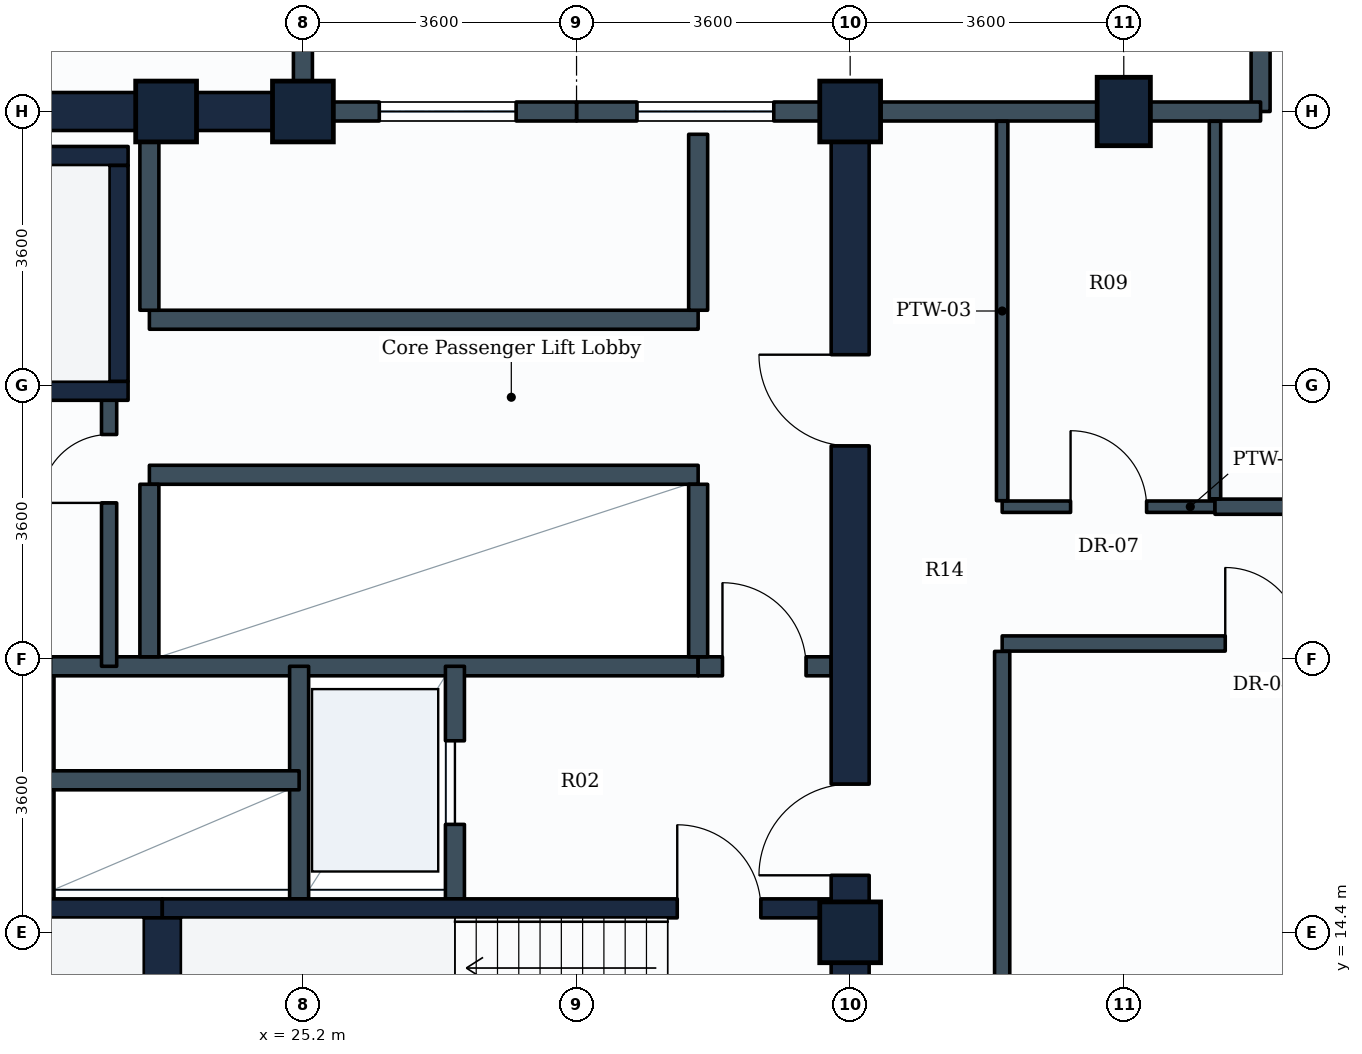
"""IFC4 building model, lengths in metres.
Left out: names, types, materials, properties, quantities, classifications, styles, units other than length and angle.
Written with IfcOpenShell. Run it as: python <this file> out.ifc"""

import sys

from ifc_helpers import new_model, si_unit, direction, frame, frame_2d, origin, origin_2d, place, context, subcontext, project, spatial, rectangle, extrude, element, fill, save


model = new_model("IFC4")
c1 = context("Model", 3, precision=1e-05, world=origin(), true_north=direction((0.0, 1.0)))
c2 = subcontext(c1, "Body", "Model", "MODEL_VIEW")
j1 = project(units=[si_unit("LENGTHUNIT", "METRE"), si_unit("PLANEANGLEUNIT", "RADIAN")], contexts=[c1])
p1 = place(None, origin())
s1 = spatial("IfcSite", under=j1, at=p1, CompositionType="ELEMENT")
p2 = place(p1, origin())
s2 = spatial("IfcBuilding", under=s1, at=p2, CompositionType="ELEMENT")
p3 = place(p2, frame((0.0, 0.0, 213.8)))
s3 = spatial("IfcBuildingStorey", under=s2, at=p3, CompositionType="ELEMENT", Elevation=213.8)
for number, where, z_axis, x_axis in (
    (1, (23.4, 25.2, 0.0), (0.0, 0.0, 1.0), (1.0, 0.0, 0.0)),
    (2, (25.2, 25.2, 0.0), (0.0, 0.0, 1.0), (1.0, 0.0, 0.0)),
    (3, (32.4, 14.4, 0.0), (0.0, 0.0, 1.0), (1.0, 0.0, 0.0)),
    (4, (32.4, 25.2, 0.0), (0.0, 0.0, 1.0), (1.0, 0.0, 0.0)),
):
    element("IfcColumn", number, at=place(p3, frame(where, z_axis=z_axis, x_axis=x_axis)), inside=s3, PredefinedType="COLUMN", context=c2, shape_type="SweptSolid", body=[
        extrude(rectangle(XDim=0.8, YDim=0.8, at=origin_2d()), origin(), (0.0, 0.0, 1.0), 3.6),
    ])
p4 = place(p3, frame((36.0, 25.2, 0.0), z_axis=(0.0, 0.0, 1.0), x_axis=(1.0, 0.0, 0.0)))
e5 = element("IfcColumn", 5, at=p4, inside=s3, PredefinedType="COLUMN", context=c2, shape_type="SweptSolid", body=[
    extrude(rectangle(XDim=0.7, YDim=0.9, at=origin_2d()), origin(), (0.0, 0.0, 1.0), 3.6),
])
p5 = place(p3, frame((37.8, 27.3, 0.0), z_axis=(0.0, 0.0, 1.0), x_axis=(0.0, -1.0, 0.0)))
e6 = element("IfcWall", 6, at=p5, inside=s3, PredefinedType="STANDARD", context=c2, shape_type="SweptSolid", body=[
    extrude(rectangle(XDim=2.1, YDim=0.25, at=frame_2d((1.05, 0.0))), origin(), (0.0, 0.0, 1.0), 2.73),
])
p6 = place(p3, frame((36.0, 25.2, 0.0), z_axis=(0.0, 0.0, 1.0), x_axis=(1.0, 0.0, 0.0)))
e7 = element("IfcWall", 7, at=p6, inside=s3, PredefinedType="STANDARD", context=c2, shape_type="SweptSolid", body=[
    extrude(rectangle(XDim=1.8, YDim=0.25, at=frame_2d((0.9, 0.0))), origin(), (0.0, 0.0, 1.0), 2.73),
])
p7 = place(p3, frame((32.4, 25.2, 0.0), z_axis=(0.0, 0.0, 1.0), x_axis=(1.0, 0.0, 0.0)))
e8 = element("IfcWall", 8, at=p7, inside=s3, PredefinedType="STANDARD", context=c2, shape_type="SweptSolid", body=[
    extrude(rectangle(XDim=3.6, YDim=0.25, at=frame_2d((1.8, 0.0))), origin(), (0.0, 0.0, 1.0), 2.73),
])
p8 = place(p3, frame((28.8, 25.2, 0.0), z_axis=(0.0, 0.0, 1.0), x_axis=(1.0, 0.0, 0.0)))
e9 = element("IfcWall", 9, at=p8, inside=s3, PredefinedType="STANDARD", context=c2, shape_type="SweptSolid", body=[
    extrude(rectangle(XDim=3.6, YDim=0.25, at=frame_2d((1.8, 0.0))), origin(), (0.0, 0.0, 1.0), 2.73),
])
p9 = place(p8, frame((0.795, 0.0, 0.85)))
e10 = element("IfcOpeningElement", 10, at=p9, cuts=e9, PredefinedType="OPENING", context=c2, shape_type="SweptSolid", body=[
    extrude(rectangle(XDim=1.8, YDim=1.35, at=frame_2d((0.9, 0.675))), frame((0.0, 0.135, 0.0), z_axis=(0.0, -1.0, 0.0), x_axis=(1.0, 0.0, 0.0)), (0.0, 0.0, 1.0), 0.27),
])
p10 = place(p3, frame((25.2, 25.2, 0.0), z_axis=(0.0, 0.0, 1.0), x_axis=(1.0, 0.0, 0.0)))
e11 = element("IfcWall", 11, at=p10, inside=s3, PredefinedType="STANDARD", context=c2, shape_type="SweptSolid", body=[
    extrude(rectangle(XDim=3.6, YDim=0.25, at=frame_2d((1.8, 0.0))), origin(), (0.0, 0.0, 1.0), 2.73),
])
p11 = place(p10, frame((1.005, 0.0, 0.85)))
e12 = element("IfcOpeningElement", 12, at=p11, cuts=e11, PredefinedType="OPENING", context=c2, shape_type="SweptSolid", body=[
    extrude(rectangle(XDim=1.8, YDim=1.35, at=frame_2d((0.9, 0.675))), frame((0.0, 0.135, 0.0), z_axis=(0.0, -1.0, 0.0), x_axis=(1.0, 0.0, 0.0)), (0.0, 0.0, 1.0), 0.27),
])
p12 = place(p3, frame((25.2, 25.2, 0.0), z_axis=(0.0, 0.0, 1.0), x_axis=(0.0, 1.0, 0.0)))
e13 = element("IfcWall", 13, at=p12, inside=s3, PredefinedType="STANDARD", context=c2, shape_type="SweptSolid", body=[
    extrude(rectangle(XDim=3.6, YDim=0.25, at=frame_2d((1.8, 0.0))), origin(), (0.0, 0.0, 1.0), 2.73),
])
p13 = place(p3, frame((14.4, 25.2, 0.0), z_axis=(0.0, 0.0, 1.0), x_axis=(1.0, 0.0, 0.0)))
e14 = element("IfcWall", 14, at=p13, inside=s3, PredefinedType="SHEAR", context=c2, shape_type="SweptSolid", body=[
    extrude(rectangle(XDim=10.8, YDim=0.5, at=frame_2d((5.4, 0.0))), origin(), (0.0, 0.0, 1.0), 3.35),
])
p14 = place(p3, frame((32.4, 10.8, 0.0), z_axis=(0.0, 0.0, 1.0), x_axis=(0.0, 1.0, 0.0)))
e15 = element("IfcWall", 15, at=p14, inside=s3, PredefinedType="SHEAR", context=c2, shape_type="SweptSolid", body=[
    extrude(rectangle(XDim=14.4, YDim=0.5, at=frame_2d((7.2, 0.0))), origin(), (0.0, 0.0, 1.0), 3.35),
])
p15 = place(p14, frame((4.35, 0.0, 0.0)))
e16 = element("IfcOpeningElement", 16, at=p15, cuts=e15, PredefinedType="OPENING", context=c2, shape_type="SweptSolid", body=[
    extrude(rectangle(XDim=1.2, YDim=2.1, at=frame_2d((0.6, 1.05))), frame((0.0, 0.26, 0.0), z_axis=(0.0, -1.0, 0.0), x_axis=(1.0, 0.0, 0.0)), (0.0, 0.0, 1.0), 0.52),
])
p16 = place(p14, frame((10.0, 0.0, 0.0)))
e17 = element("IfcOpeningElement", 17, at=p16, cuts=e15, PredefinedType="OPENING", context=c2, shape_type="SweptSolid", body=[
    extrude(rectangle(XDim=1.2, YDim=2.1, at=frame_2d((0.6, 1.05))), frame((0.0, 0.26, 0.0), z_axis=(0.0, -1.0, 0.0), x_axis=(1.0, 0.0, 0.0)), (0.0, 0.0, 1.0), 0.52),
])
p17 = place(p3, frame((14.65, 14.715, 0.0), z_axis=(0.0, 0.0, 1.0), x_axis=(1.0, 0.0, 0.0)))
e18 = element("IfcWall", 18, at=p17, inside=s3, PredefinedType="SHEAR", context=c2, shape_type="SweptSolid", body=[
    extrude(rectangle(XDim=8.7, YDim=0.25, at=frame_2d((4.35, 0.0))), origin(), (0.0, 0.0, 1.0), 3.35),
])
p18 = place(p17, frame((0.705, 0.0, 0.0)))
e19 = element("IfcOpeningElement", 19, at=p18, cuts=e18, PredefinedType="OPENING", context=c2, shape_type="SweptSolid", body=[
    extrude(rectangle(XDim=1.1, YDim=2.1, at=frame_2d((0.55, 1.05))), frame((0.0, 0.135, 0.0), z_axis=(0.0, -1.0, 0.0), x_axis=(1.0, 0.0, 0.0)), (0.0, 0.0, 1.0), 0.27),
])
p19 = place(p3, frame((23.35, 14.715, 0.0), z_axis=(0.0, 0.0, 1.0), x_axis=(1.0, 0.0, 0.0)))
e20 = element("IfcWall", 20, at=p19, inside=s3, PredefinedType="SHEAR", context=c2, shape_type="SweptSolid", body=[
    extrude(rectangle(XDim=8.8, YDim=0.25, at=frame_2d((4.4, 0.0))), origin(), (0.0, 0.0, 1.0), 3.35),
])
p20 = place(p19, frame((6.775, 0.0, 0.0)))
e21 = element("IfcOpeningElement", 21, at=p20, cuts=e20, PredefinedType="OPENING", context=c2, shape_type="SweptSolid", body=[
    extrude(rectangle(XDim=1.1, YDim=2.1, at=frame_2d((0.55, 1.05))), frame((0.0, 0.135, 0.0), z_axis=(0.0, -1.0, 0.0), x_axis=(1.0, 0.0, 0.0)), (0.0, 0.0, 1.0), 0.27),
])
p21 = place(p3, frame((23.35, 11.75, 0.0), z_axis=(0.0, 0.0, 1.0), x_axis=(0.0, 1.0, 0.0)))
e22 = element("IfcWall", 22, at=p21, inside=s3, PredefinedType="SHEAR", context=c2, shape_type="SweptSolid", body=[
    extrude(rectangle(XDim=2.84, YDim=0.5, at=frame_2d((1.42, 0.0))), origin(), (0.0, 0.0, 1.0), 3.35),
])
for number, where, z_axis, x_axis in (
    (23, (14.65, 21.525, 0.0), (0.0, 0.0, 1.0), (1.0, 0.0, 0.0)),
    (24, (14.65, 24.615, 0.0), (0.0, 0.0, 1.0), (1.0, 0.0, 0.0)),
):
    element("IfcWall", number, at=place(p3, frame(where, z_axis=z_axis, x_axis=x_axis)), inside=s3, PredefinedType="SHEAR", context=c2, shape_type="SweptSolid", body=[
        extrude(rectangle(XDim=8.25, YDim=0.25, at=frame_2d((4.125, 0.0))), origin(), (0.0, 0.0, 1.0), 3.35),
    ])
p22 = place(p3, frame((22.775, 21.65, 0.0), z_axis=(0.0, 0.0, 1.0), x_axis=(0.0, 1.0, 0.0)))
e25 = element("IfcWall", 25, at=p22, inside=s3, PredefinedType="SHEAR", context=c2, shape_type="SweptSolid", body=[
    extrude(rectangle(XDim=2.84, YDim=0.25, at=frame_2d((1.42, 0.0))), origin(), (0.0, 0.0, 1.0), 3.35),
])
p23 = place(p3, frame((21.8, 14.84, 0.0), z_axis=(0.0, 0.0, 1.0), x_axis=(0.0, 1.0, 0.0)))
e26 = element("IfcWall", 26, at=p23, inside=s3, PredefinedType="PARTITIONING", context=c2, shape_type="SweptSolid", body=[
    extrude(rectangle(XDim=3.06, YDim=0.25, at=frame_2d((1.53, 0.0))), origin(), (0.0, 0.0, 1.0), 3.335),
])
p24 = place(p3, frame((21.88, 17.9, 0.0), z_axis=(0.0, 0.0, 1.0), x_axis=(1.0, 0.0, 0.0)))
e27 = element("IfcWall", 27, at=p24, inside=s3, PredefinedType="PARTITIONING", context=c2, shape_type="SweptSolid", body=[
    extrude(rectangle(XDim=8.52, YDim=0.25, at=frame_2d((4.26, 0.0))), origin(), (0.0, 0.0, 1.0), 3.335),
])
p25 = place(p3, frame((30.4, 17.9, 0.0), z_axis=(0.0, 0.0, 1.0), x_axis=(1.0, 0.0, 0.0)))
e28 = element("IfcWall", 28, at=p25, inside=s3, PredefinedType="PARTITIONING", context=c2, shape_type="SweptSolid", body=[
    extrude(rectangle(XDim=1.75, YDim=0.25, at=frame_2d((0.875, 0.0))), origin(), (0.0, 0.0, 1.0), 3.335),
])
p26 = place(p25, frame((0.32, 0.0, 0.0)))
e29 = element("IfcOpeningElement", 29, at=p26, cuts=e28, PredefinedType="OPENING", context=c2, shape_type="SweptSolid", body=[
    extrude(rectangle(XDim=1.1, YDim=2.1, at=frame_2d((0.55, 1.05))), frame((0.0, 0.135, 0.0), z_axis=(0.0, -1.0, 0.0), x_axis=(1.0, 0.0, 0.0)), (0.0, 0.0, 1.0), 0.27),
])
p27 = place(p3, frame((25.15, 14.84, 0.0), z_axis=(0.0, 0.0, 1.0), x_axis=(0.0, 1.0, 0.0)))
e30 = element("IfcWall", 30, at=p27, inside=s3, PredefinedType="PARTITIONING", context=c2, shape_type="SweptSolid", body=[
    extrude(rectangle(XDim=3.06, YDim=0.25, at=frame_2d((1.53, 0.0))), origin(), (0.0, 0.0, 1.0), 3.335),
])
p28 = place(p3, frame((27.2, 14.84, 0.0), z_axis=(0.0, 0.0, 1.0), x_axis=(0.0, 1.0, 0.0)))
e31 = element("IfcWall", 31, at=p28, inside=s3, PredefinedType="PARTITIONING", context=c2, shape_type="SweptSolid", body=[
    extrude(rectangle(XDim=3.06, YDim=0.25, at=frame_2d((1.53, 0.0))), origin(), (0.0, 0.0, 1.0), 3.335),
])
p29 = place(p28, frame((0.98, 0.0, 0.0)))
e32 = element("IfcOpeningElement", 32, at=p29, cuts=e31, PredefinedType="OPENING", context=c2, shape_type="SweptSolid", body=[
    extrude(rectangle(XDim=1.1, YDim=2.1, at=frame_2d((0.55, 1.05))), frame((0.0, 0.135, 0.0), z_axis=(0.0, -1.0, 0.0), x_axis=(1.0, 0.0, 0.0)), (0.0, 0.0, 1.0), 0.27),
])
p30 = place(p3, frame((21.8, 16.4, 0.0), z_axis=(0.0, 0.0, 1.0), x_axis=(1.0, 0.0, 0.0)))
e33 = element("IfcWall", 33, at=p30, inside=s3, PredefinedType="PARTITIONING", context=c2, shape_type="SweptSolid", body=[
    extrude(rectangle(XDim=3.35, YDim=0.25, at=frame_2d((1.675, 0.0))), origin(), (0.0, 0.0, 1.0), 3.335),
])
p31 = place(p3, frame((23.18, 20.42, 0.0), z_axis=(0.0, 0.0, 1.0), x_axis=(1.0, 0.0, 0.0)))
e34 = element("IfcWall", 34, at=p31, inside=s3, PredefinedType="PARTITIONING", context=c2, shape_type="SweptSolid", body=[
    extrude(rectangle(XDim=7.22, YDim=0.25, at=frame_2d((3.61, 0.0))), origin(), (0.0, 0.0, 1.0), 3.335),
])
for number, where, z_axis, x_axis in (
    (35, (23.18, 18.025, 0.0), (0.0, 0.0, 1.0), (0.0, 1.0, 0.0)),
    (36, (30.4, 18.025, 0.0), (0.0, 0.0, 1.0), (0.0, 1.0, 0.0)),
):
    element("IfcWall", number, at=place(p3, frame(where, z_axis=z_axis, x_axis=x_axis)), inside=s3, PredefinedType="PARTITIONING", context=c2, shape_type="SweptSolid", body=[
        extrude(rectangle(XDim=2.27, YDim=0.25, at=frame_2d((1.135, 0.0))), origin(), (0.0, 0.0, 1.0), 3.335),
    ])
p32 = place(p3, frame((23.18, 22.46, 0.0), z_axis=(0.0, 0.0, 1.0), x_axis=(1.0, 0.0, 0.0)))
e37 = element("IfcWall", 37, at=p32, inside=s3, PredefinedType="PARTITIONING", context=c2, shape_type="SweptSolid", body=[
    extrude(rectangle(XDim=7.22, YDim=0.25, at=frame_2d((3.61, 0.0))), origin(), (0.0, 0.0, 1.0), 3.335),
])
for number, where, z_axis, x_axis in (
    (38, (23.18, 22.585, 0.0), (0.0, 0.0, 1.0), (0.0, 1.0, 0.0)),
    (39, (30.4, 22.585, 0.0), (0.0, 0.0, 1.0), (0.0, 1.0, 0.0)),
):
    element("IfcWall", number, at=place(p3, frame(where, z_axis=z_axis, x_axis=x_axis)), inside=s3, PredefinedType="PARTITIONING", context=c2, shape_type="SweptSolid", body=[
        extrude(rectangle(XDim=2.315, YDim=0.25, at=frame_2d((1.157, 0.0))), origin(), (0.0, 0.0, 1.0), 3.335),
    ])
p33 = place(p3, frame((22.65, 17.9, 0.0), z_axis=(0.0, 0.0, 1.0), x_axis=(0.0, 1.0, 0.0)))
e40 = element("IfcWall", 40, at=p33, inside=s3, PredefinedType="PARTITIONING", context=c2, shape_type="SweptSolid", body=[
    extrude(rectangle(XDim=3.625, YDim=0.2, at=frame_2d((1.812, 0.0))), origin(), (0.0, 0.0, 1.0), 3.335),
])
p34 = place(p33, frame((2.15, 0.0, 0.0)))
e41 = element("IfcOpeningElement", 41, at=p34, cuts=e40, PredefinedType="OPENING", context=c2, shape_type="SweptSolid", body=[
    extrude(rectangle(XDim=0.9, YDim=2.1, at=frame_2d((0.45, 1.05))), frame((0.0, 0.11, 0.0), z_axis=(0.0, -1.0, 0.0), x_axis=(1.0, 0.0, 0.0)), (0.0, 0.0, 1.0), 0.22),
])
p35 = place(p3, frame((34.4, 18.2, 0.0), z_axis=(0.0, 0.0, 1.0), x_axis=(1.0, 0.0, 0.0)))
e42 = element("IfcWall", 42, at=p35, inside=s3, PredefinedType="PARTITIONING", context=c2, shape_type="SweptSolid", body=[
    extrude(rectangle(XDim=6.95, YDim=0.2, at=frame_2d((3.475, 0.0))), origin(), (0.0, 0.0, 1.0), 3.0),
])
p36 = place(p35, frame((2.935, 0.0, 0.0)))
e43 = element("IfcOpeningElement", 43, at=p36, cuts=e42, PredefinedType="OPENING", context=c2, shape_type="SweptSolid", body=[
    extrude(rectangle(XDim=1.0, YDim=2.1, at=frame_2d((0.5, 1.05))), frame((0.0, 0.11, 0.0), z_axis=(0.0, -1.0, 0.0), x_axis=(1.0, 0.0, 0.0)), (0.0, 0.0, 1.0), 0.22),
])
p37 = place(p3, frame((34.4, 3.729, 0.0), z_axis=(0.0, 0.0, 1.0), x_axis=(0.0, 1.0, 0.0)))
e44 = element("IfcWall", 44, at=p37, inside=s3, PredefinedType="PARTITIONING", context=c2, shape_type="SweptSolid", body=[
    extrude(rectangle(XDim=14.367, YDim=0.2, at=frame_2d((7.184, 0.0))), origin(), (0.0, 0.0, 1.0), 2.73),
])
p38 = place(p3, frame((34.4, 20.0, 0.0), z_axis=(0.0, 0.0, 1.0), x_axis=(1.0, 0.0, 0.0)))
e45 = element("IfcWall", 45, at=p38, inside=s3, PredefinedType="PARTITIONING", context=c2, shape_type="SweptSolid", body=[
    extrude(rectangle(XDim=2.8, YDim=0.15, at=frame_2d((1.4, 0.0))), origin(), (0.0, 0.0, 1.0), 3.06),
])
p39 = place(p38, frame((0.9, 0.0, 0.0)))
e46 = element("IfcOpeningElement", 46, at=p39, cuts=e45, PredefinedType="OPENING", context=c2, shape_type="SweptSolid", body=[
    extrude(rectangle(XDim=1.0, YDim=2.1, at=frame_2d((0.5, 1.05))), frame((0.0, 0.085, 0.0), z_axis=(0.0, -1.0, 0.0), x_axis=(1.0, 0.0, 0.0)), (0.0, 0.0, 1.0), 0.17),
])
p40 = place(p3, frame((37.2, 20.0, 0.0), z_axis=(0.0, 0.0, 1.0), x_axis=(1.0, 0.0, 0.0)))
e47 = element("IfcWall", 47, at=p40, inside=s3, PredefinedType="PARTITIONING", context=c2, shape_type="SweptSolid", body=[
    extrude(rectangle(XDim=13.071, YDim=0.2, at=frame_2d((6.536, 0.0))), origin(), (0.0, 0.0, 1.0), 2.73),
])
p41 = place(p40, frame((5.96, 0.0, 0.0)))
e48 = element("IfcOpeningElement", 48, at=p41, cuts=e47, PredefinedType="OPENING", context=c2, shape_type="SweptSolid", body=[
    extrude(rectangle(XDim=1.2, YDim=2.1, at=frame_2d((0.6, 1.05))), frame((0.0, 0.11, 0.0), z_axis=(0.0, -1.0, 0.0), x_axis=(1.0, 0.0, 0.0)), (0.0, 0.0, 1.0), 0.22),
])
p42 = place(p3, frame((34.4, 20.079, 0.0), z_axis=(0.0, 0.0, 1.0), x_axis=(0.0, 1.0, 0.0)))
e49 = element("IfcWall", 49, at=p42, inside=s3, PredefinedType="PARTITIONING", context=c2, shape_type="SweptSolid", body=[
    extrude(rectangle(XDim=4.992, YDim=0.15, at=frame_2d((2.496, 0.0))), origin(), (0.0, 0.0, 1.0), 2.73),
])
p43 = place(p3, frame((37.2, 20.104, 0.0), z_axis=(0.0, 0.0, 1.0), x_axis=(0.0, 1.0, 0.0)))
e50 = element("IfcWall", 50, at=p43, inside=s3, PredefinedType="PARTITIONING", context=c2, shape_type="SweptSolid", body=[
    extrude(rectangle(XDim=4.967, YDim=0.15, at=frame_2d((2.483, 0.0))), origin(), (0.0, 0.0, 1.0), 2.73),
])
p44 = place(p9, origin())
e51 = element("IfcWindow", 51, at=p44, inside=s3, PartitioningType="SINGLE_PANEL", PredefinedType="WINDOW", context=c2, shape_type="SweptSolid", body=[
    extrude(rectangle(XDim=1.8, YDim=1.35, at=frame_2d((0.9, 0.675))), frame((0.0, 0.03, 0.0), z_axis=(0.0, -1.0, 0.0), x_axis=(1.0, 0.0, 0.0)), (0.0, 0.0, 1.0), 0.06),
])
fill(e10, e51)
p45 = place(p11, origin())
e52 = element("IfcWindow", 52, at=p45, inside=s3, PartitioningType="SINGLE_PANEL", PredefinedType="WINDOW", context=c2, shape_type="SweptSolid", body=[
    extrude(rectangle(XDim=1.8, YDim=1.35, at=frame_2d((0.9, 0.675))), frame((0.0, 0.03, 0.0), z_axis=(0.0, -1.0, 0.0), x_axis=(1.0, 0.0, 0.0)), (0.0, 0.0, 1.0), 0.06),
])
fill(e12, e52)
p46 = place(p20, origin())
e53 = element("IfcDoor", 53, at=p46, inside=s3, OperationType="SINGLE_SWING_LEFT", PredefinedType="DOOR", context=c2, shape_type="SweptSolid", body=[
    extrude(rectangle(XDim=1.1, YDim=2.1, at=frame_2d((0.55, 1.05))), frame((0.0, 0.025, 0.0), z_axis=(0.0, -1.0, 0.0), x_axis=(1.0, 0.0, 0.0)), (0.0, 0.0, 1.0), 0.05),
])
fill(e21, e53)
p47 = place(p29, origin())
e54 = element("IfcDoor", 54, at=p47, inside=s3, OperationType="SLIDING_TO_LEFT", PredefinedType="DOOR", context=c2, shape_type="SweptSolid", body=[
    extrude(rectangle(XDim=1.1, YDim=2.1, at=frame_2d((0.55, 1.05))), frame((0.0, 0.025, 0.0), z_axis=(0.0, -1.0, 0.0), x_axis=(1.0, 0.0, 0.0)), (0.0, 0.0, 1.0), 0.05),
])
fill(e32, e54)
p48 = place(p15, origin())
e55 = element("IfcDoor", 55, at=p48, inside=s3, OperationType="SINGLE_SWING_LEFT", PredefinedType="DOOR", context=c2, shape_type="SweptSolid", body=[
    extrude(rectangle(XDim=1.2, YDim=2.1, at=frame_2d((0.6, 1.05))), frame((0.0, 0.025, 0.0), z_axis=(0.0, -1.0, 0.0), x_axis=(1.0, 0.0, 0.0)), (0.0, 0.0, 1.0), 0.05),
])
fill(e16, e55)
p49 = place(p26, origin())
e56 = element("IfcDoor", 56, at=p49, inside=s3, OperationType="SINGLE_SWING_LEFT", PredefinedType="DOOR", context=c2, shape_type="SweptSolid", body=[
    extrude(rectangle(XDim=1.1, YDim=2.1, at=frame_2d((0.55, 1.05))), frame((0.0, 0.025, 0.0), z_axis=(0.0, -1.0, 0.0), x_axis=(1.0, 0.0, 0.0)), (0.0, 0.0, 1.0), 0.05),
])
fill(e29, e56)
p50 = place(p16, origin())
e57 = element("IfcDoor", 57, at=p50, inside=s3, OperationType="SINGLE_SWING_RIGHT", PredefinedType="DOOR", context=c2, shape_type="SweptSolid", body=[
    extrude(rectangle(XDim=1.2, YDim=2.1, at=frame_2d((0.6, 1.05))), frame((0.0, 0.025, 0.0), z_axis=(0.0, -1.0, 0.0), x_axis=(1.0, 0.0, 0.0)), (0.0, 0.0, 1.0), 0.05),
])
fill(e17, e57)
p51 = place(p34, origin())
e58 = element("IfcDoor", 58, at=p51, inside=s3, OperationType="SINGLE_SWING_LEFT", PredefinedType="DOOR", context=c2, shape_type="SweptSolid", body=[
    extrude(rectangle(XDim=0.9, YDim=2.1, at=frame_2d((0.45, 1.05))), frame((0.0, 0.025, 0.0), z_axis=(0.0, -1.0, 0.0), x_axis=(1.0, 0.0, 0.0)), (0.0, 0.0, 1.0), 0.05),
])
fill(e41, e58)
p52 = place(p36, origin())
e59 = element("IfcDoor", 59, at=p52, inside=s3, OperationType="SINGLE_SWING_LEFT", PredefinedType="DOOR", context=c2, shape_type="SweptSolid", body=[
    extrude(rectangle(XDim=1.0, YDim=2.1, at=frame_2d((0.5, 1.05))), frame((0.0, 0.025, 0.0), z_axis=(0.0, -1.0, 0.0), x_axis=(1.0, 0.0, 0.0)), (0.0, 0.0, 1.0), 0.05),
])
fill(e43, e59)
p53 = place(p39, origin())
e60 = element("IfcDoor", 60, at=p53, inside=s3, OperationType="SINGLE_SWING_LEFT", PredefinedType="DOOR", context=c2, shape_type="SweptSolid", body=[
    extrude(rectangle(XDim=1.0, YDim=2.1, at=frame_2d((0.5, 1.05))), frame((0.0, 0.025, 0.0), z_axis=(0.0, -1.0, 0.0), x_axis=(1.0, 0.0, 0.0)), (0.0, 0.0, 1.0), 0.05),
])
fill(e46, e60)
save(model, sys.argv[1])
